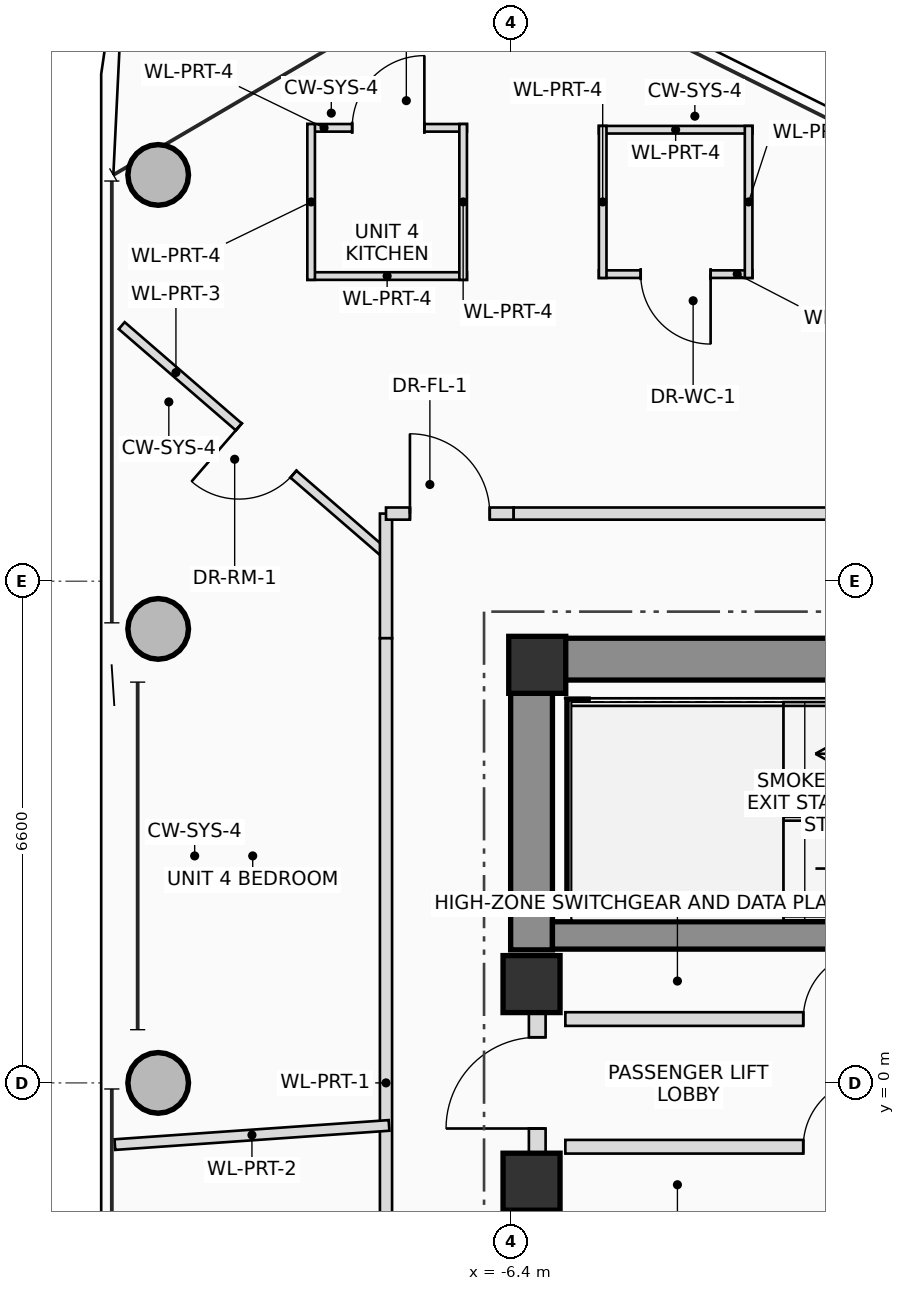
"""IFC4 building model, lengths in metres.
Left out: names, types, materials, properties, quantities, classifications, styles, units other than length and angle.
Written with IfcOpenShell. Run it as: python <this file> out.ifc"""

import sys

from ifc_helpers import new_model, si_unit, direction, frame, frame_2d, origin, origin_2d, place, context, subcontext, project, spatial, rectangle, hollow_circle, extrude, source, transform, mapped, element, fill, save


model = new_model("IFC4")
c1 = context("Model", 3, precision=1e-05, world=origin(), true_north=direction((0.0, 1.0)))
c2 = subcontext(c1, "Body", "Model", "MODEL_VIEW")
j1 = project(units=[si_unit("LENGTHUNIT", "METRE"), si_unit("PLANEANGLEUNIT", "RADIAN")], contexts=[c1])
p1 = place(None, origin())
s1 = spatial("IfcSite", under=j1, at=p1, CompositionType="ELEMENT")
p2 = place(p1, origin())
s2 = spatial("IfcBuilding", under=s1, at=p2, CompositionType="ELEMENT")
p3 = place(p2, frame((0.0, 0.0, 307.1)))
s3 = spatial("IfcBuildingStorey", under=s2, at=p3, CompositionType="ELEMENT", Elevation=307.1)
m1 = source(origin(), c2, "Body", "SweptSolid", [
    extrude(rectangle(XDim=0.75, YDim=0.75, at=origin_2d()), origin(), (0.0, 0.0, 1.0), 3.45),
])
p4 = place(p3, frame((-6.05, 5.5, 0.0), z_axis=(0.0, 0.0, 1.0), x_axis=(1.0, 0.0, 0.0)))
e1 = element("IfcColumn", 1, at=p4, inside=s3, PredefinedType="COLUMN", context=c2, shape_type="MappedRepresentation", body=[
    mapped(m1, transform((0.0, 0.0, 0.0), scale=1.0)),
])
p5 = place(p3, frame((-6.4, 5.575, 0.0), z_axis=(0.0, 0.0, 1.0), x_axis=(1.0, 0.0, 0.0)))
e2 = element("IfcWall", 2, at=p5, inside=s3, PredefinedType="SHEAR", context=c2, shape_type="SweptSolid", body=[
    extrude(rectangle(XDim=12.8, YDim=0.55, at=frame_2d((6.4, 0.0))), origin(), (0.0, 0.0, 1.0), 3.45),
])
p6 = place(p5, frame((8.6, 0.0, 0.0)))
e3 = element("IfcOpeningElement", 3, at=p6, cuts=e2, PredefinedType="OPENING", context=c2, shape_type="SweptSolid", body=[
    extrude(rectangle(XDim=1.2, YDim=2.2, at=frame_2d((0.6, 1.1))), frame((0.0, 0.285, 0.0), z_axis=(0.0, -1.0, 0.0), x_axis=(1.0, 0.0, 0.0)), (0.0, 0.0, 1.0), 0.57),
])
p7 = place(p3, frame((-6.125, 1.75, 0.0), z_axis=(0.0, 0.0, 1.0), x_axis=(0.0, 1.0, 0.0)))
e4 = element("IfcWall", 4, at=p7, inside=s3, PredefinedType="SHEAR", context=c2, shape_type="SweptSolid", body=[
    extrude(rectangle(XDim=3.55, YDim=0.55, at=frame_2d((1.775, 0.0))), origin(), (0.0, 0.0, 1.0), 3.45),
])
p8 = place(p3, frame((-5.85, 1.94, 0.0), z_axis=(0.0, 0.0, 1.0), x_axis=(1.0, 0.0, 0.0)))
e5 = element("IfcWall", 5, at=p8, inside=s3, PredefinedType="SHEAR", context=c2, shape_type="SweptSolid", body=[
    extrude(rectangle(XDim=11.7, YDim=0.36, at=frame_2d((5.85, 0.0))), origin(), (0.0, 0.0, 1.0), 3.45),
])
p9 = place(p3, frame((-5.52, 2.3, 0.0), z_axis=(0.0, 0.0, 1.0), x_axis=(0.0, 1.0, 0.0)))
e6 = element("IfcWall", 6, at=p9, inside=s3, PredefinedType="SHEAR", context=c2, shape_type="SweptSolid", body=[
    extrude(rectangle(XDim=2.75, YDim=0.28, at=frame_2d((1.375, 0.0))), origin(), (0.0, 0.0, 1.0), 3.45),
])
for number, where, z_axis, x_axis in (
    (7, (-6.125, -1.3, 0.0), (0.0, 0.0, 1.0), (1.0, 0.0, 0.0)),
    (8, (-6.125, 1.3, 0.0), (0.0, 0.0, 1.0), (1.0, 0.0, 0.0)),
):
    element("IfcColumn", number, at=place(p3, frame(where, z_axis=z_axis, x_axis=x_axis)), inside=s3, PredefinedType="COLUMN", context=c2, shape_type="MappedRepresentation", body=[
        mapped(m1, transform((0.0, 0.0, 0.0), scale=1.0)),
    ])
m2 = source(origin(), c2, "Body", "SweptSolid", [
    extrude(hollow_circle(Radius=0.4, WallThickness=0.028, at=origin_2d()), origin(), (0.0, 0.0, 1.0), 3.45),
])
for number, where, z_axis, x_axis in (
    (9, (-11.037, 11.945, 0.0), (0.0, 0.0, 1.0), (1.0, 0.0, 0.0)),
    (10, (-11.037, 5.973, 0.0), (0.0, 0.0, 1.0), (1.0, 0.0, 0.0)),
    (11, (-11.037, 0.0, 0.0), (0.0, 0.0, 1.0), (1.0, 0.0, 0.0)),
):
    element("IfcColumn", number, at=place(p3, frame(where, z_axis=z_axis, x_axis=x_axis)), inside=s3, PredefinedType="COLUMN", context=c2, shape_type="MappedRepresentation", body=[
        mapped(m2, transform((0.0, 0.0, 0.0), scale=1.0)),
    ])
p10 = place(p3, frame((-6.05, -0.95, 0.0), z_axis=(0.0, 0.0, 1.0), x_axis=(0.0, 1.0, 0.0)))
e12 = element("IfcWall", 12, at=p10, inside=s3, PredefinedType="PLUMBINGWALL", context=c2, shape_type="SweptSolid", body=[
    extrude(rectangle(XDim=1.9, YDim=0.22, at=frame_2d((0.95, 0.0))), origin(), (0.0, 0.0, 1.0), 2.23),
])
p11 = place(p10, frame((0.35, 0.0, 0.0)))
e13 = element("IfcOpeningElement", 13, at=p11, cuts=e12, PredefinedType="OPENING", context=c2, shape_type="SweptSolid", body=[
    extrude(rectangle(XDim=1.2, YDim=2.2, at=frame_2d((0.6, 1.1))), frame((0.0, 0.12, 0.0), z_axis=(0.0, -1.0, 0.0), x_axis=(1.0, 0.0, 0.0)), (0.0, 0.0, 1.0), 0.24),
])
p12 = place(p3, frame((-5.68, 0.84, 0.0), z_axis=(0.0, 0.0, 1.0), x_axis=(1.0, 0.0, 0.0)))
e14 = element("IfcWall", 14, at=p12, inside=s3, PredefinedType="PLUMBINGWALL", context=c2, shape_type="SweptSolid", body=[
    extrude(rectangle(XDim=11.33, YDim=0.18, at=frame_2d((5.665, 0.0))), origin(), (0.0, 0.0, 1.0), 3.25),
])
p13 = place(p12, frame((3.13, 0.0, 0.0)))
e15 = element("IfcOpeningElement", 15, at=p13, cuts=e14, PredefinedType="OPENING", context=c2, shape_type="SweptSolid", body=[
    extrude(rectangle(XDim=0.9, YDim=2.05, at=frame_2d((0.45, 1.025))), frame((0.0, 0.1, 0.0), z_axis=(0.0, -1.0, 0.0), x_axis=(1.0, 0.0, 0.0)), (0.0, 0.0, 1.0), 0.2),
])
p14 = place(p12, frame((7.33, 0.0, 0.0)))
e16 = element("IfcOpeningElement", 16, at=p14, cuts=e14, PredefinedType="OPENING", context=c2, shape_type="SweptSolid", body=[
    extrude(rectangle(XDim=1.1, YDim=2.2, at=frame_2d((0.55, 1.1))), frame((0.0, 0.1, 0.0), z_axis=(0.0, -1.0, 0.0), x_axis=(1.0, 0.0, 0.0)), (0.0, 0.0, 1.0), 0.2),
])
p15 = place(p12, frame((8.83, 0.0, 0.0)))
e17 = element("IfcOpeningElement", 17, at=p15, cuts=e14, PredefinedType="OPENING", context=c2, shape_type="SweptSolid", body=[
    extrude(rectangle(XDim=1.1, YDim=2.2, at=frame_2d((0.55, 1.1))), frame((0.0, 0.1, 0.0), z_axis=(0.0, -1.0, 0.0), x_axis=(1.0, 0.0, 0.0)), (0.0, 0.0, 1.0), 0.2),
])
p16 = place(p12, frame((10.25, 0.0, 0.0)))
e18 = element("IfcOpeningElement", 18, at=p16, cuts=e14, PredefinedType="OPENING", context=c2, shape_type="SweptSolid", body=[
    extrude(rectangle(XDim=0.9, YDim=2.05, at=frame_2d((0.45, 1.025))), frame((0.0, 0.1, 0.0), z_axis=(0.0, -1.0, 0.0), x_axis=(1.0, 0.0, 0.0)), (0.0, 0.0, 1.0), 0.2),
])
p17 = place(p3, frame((-5.68, -0.84, 0.0), z_axis=(0.0, 0.0, 1.0), x_axis=(1.0, 0.0, 0.0)))
e19 = element("IfcWall", 19, at=p17, inside=s3, PredefinedType="PLUMBINGWALL", context=c2, shape_type="SweptSolid", body=[
    extrude(rectangle(XDim=11.33, YDim=0.18, at=frame_2d((5.665, 0.0))), origin(), (0.0, 0.0, 1.0), 3.25),
])
p18 = place(p17, frame((3.13, 0.0, 0.0)))
e20 = element("IfcOpeningElement", 20, at=p18, cuts=e19, PredefinedType="OPENING", context=c2, shape_type="SweptSolid", body=[
    extrude(rectangle(XDim=0.9, YDim=2.05, at=frame_2d((0.45, 1.025))), frame((0.0, 0.1, 0.0), z_axis=(0.0, -1.0, 0.0), x_axis=(1.0, 0.0, 0.0)), (0.0, 0.0, 1.0), 0.2),
])
p19 = place(p17, frame((7.33, 0.0, 0.0)))
e21 = element("IfcOpeningElement", 21, at=p19, cuts=e19, PredefinedType="OPENING", context=c2, shape_type="SweptSolid", body=[
    extrude(rectangle(XDim=1.1, YDim=2.2, at=frame_2d((0.55, 1.1))), frame((0.0, 0.1, 0.0), z_axis=(0.0, -1.0, 0.0), x_axis=(1.0, 0.0, 0.0)), (0.0, 0.0, 1.0), 0.2),
])
p20 = place(p17, frame((9.58, 0.0, 0.0)))
e22 = element("IfcOpeningElement", 22, at=p20, cuts=e19, PredefinedType="OPENING", context=c2, shape_type="SweptSolid", body=[
    extrude(rectangle(XDim=0.9, YDim=2.05, at=frame_2d((0.45, 1.025))), frame((0.0, 0.1, 0.0), z_axis=(0.0, -1.0, 0.0), x_axis=(1.0, 0.0, 0.0)), (0.0, 0.0, 1.0), 0.2),
])
p21 = place(p3, frame((-8.07, 6.981, 0.0), z_axis=(0.0, 0.0, 1.0), x_axis=(-0.756280799409, 0.654247164644, 0.0)))
e23 = element("IfcWall", 23, at=p21, inside=s3, PredefinedType="PARTITIONING", context=c2, shape_type="SweptSolid", body=[
    extrude(rectangle(XDim=4.558, YDim=0.12, at=frame_2d((2.279, 0.0))), origin(), (0.0, 0.0, 1.0), 2.815),
])
p22 = place(p21, frame((1.571, 0.0, 0.0)))
e24 = element("IfcOpeningElement", 24, at=p22, cuts=e23, PredefinedType="OPENING", context=c2, shape_type="SweptSolid", body=[
    extrude(rectangle(XDim=0.95, YDim=2.1, at=frame_2d((0.475, 1.05))), frame((0.0, 0.07, 0.0), z_axis=(0.0, -1.0, 0.0), x_axis=(1.0, 0.0, 0.0)), (0.0, 0.0, 1.0), 0.14),
])
p23 = place(p3, frame((-5.239, 12.54, 0.0), z_axis=(0.0, 0.0, 1.0), x_axis=(1.0, 0.0, 0.0)))
e25 = element("IfcWall", 25, at=p23, inside=s3, PredefinedType="PARTITIONING", context=c2, shape_type="SweptSolid", body=[
    extrude(rectangle(XDim=2.02, YDim=0.1, at=frame_2d((1.01, 0.0))), origin(), (0.0, 0.0, 1.0), 2.815),
])
p24 = place(p3, frame((-3.219, 10.64, 0.0), z_axis=(0.0, 0.0, 1.0), x_axis=(-1.0, 0.0, 0.0)))
e26 = element("IfcWall", 26, at=p24, inside=s3, PredefinedType="PARTITIONING", context=c2, shape_type="SweptSolid", body=[
    extrude(rectangle(XDim=2.02, YDim=0.1, at=frame_2d((1.01, 0.0))), origin(), (0.0, 0.0, 1.0), 2.905),
])
p25 = place(p24, frame((0.55, 0.0, 0.0)))
e27 = element("IfcOpeningElement", 27, at=p25, cuts=e26, PredefinedType="OPENING", context=c2, shape_type="SweptSolid", body=[
    extrude(rectangle(XDim=0.92, YDim=2.1, at=frame_2d((0.46, 1.05))), frame((0.0, 0.06, 0.0), z_axis=(0.0, -1.0, 0.0), x_axis=(1.0, 0.0, 0.0)), (0.0, 0.0, 1.0), 0.12),
])
p26 = place(p3, frame((-3.269, 12.59, 0.0), z_axis=(0.0, 0.0, 1.0), x_axis=(0.0, -1.0, 0.0)))
e28 = element("IfcWall", 28, at=p26, inside=s3, PredefinedType="PARTITIONING", context=c2, shape_type="SweptSolid", body=[
    extrude(rectangle(XDim=2.0, YDim=0.1, at=frame_2d((1.0, 0.0))), origin(), (0.0, 0.0, 1.0), 2.815),
])
p27 = place(p3, frame((-5.189, 10.59, 0.0), z_axis=(0.0, 0.0, 1.0), x_axis=(0.0, 1.0, 0.0)))
e29 = element("IfcWall", 29, at=p27, inside=s3, PredefinedType="PARTITIONING", context=c2, shape_type="SweptSolid", body=[
    extrude(rectangle(XDim=2.0, YDim=0.1, at=frame_2d((1.0, 0.0))), origin(), (0.0, 0.0, 1.0), 2.905),
])
p28 = place(p3, frame((-9.075, 12.565, 0.0), z_axis=(0.0, 0.0, 1.0), x_axis=(1.0, 0.0, 0.0)))
e30 = element("IfcWall", 30, at=p28, inside=s3, PredefinedType="PARTITIONING", context=c2, shape_type="SweptSolid", body=[
    extrude(rectangle(XDim=2.1, YDim=0.1, at=frame_2d((1.05, 0.0))), origin(), (0.0, 0.0, 1.0), 3.25),
])
p29 = place(p28, frame((0.59, 0.0, 0.0)))
e31 = element("IfcOpeningElement", 31, at=p29, cuts=e30, PredefinedType="OPENING", context=c2, shape_type="SweptSolid", body=[
    extrude(rectangle(XDim=0.95, YDim=2.1, at=frame_2d((0.475, 1.05))), frame((0.0, 0.06, 0.0), z_axis=(0.0, -1.0, 0.0), x_axis=(1.0, 0.0, 0.0)), (0.0, 0.0, 1.0), 0.12),
])
p30 = place(p3, frame((-6.975, 10.615, 0.0), z_axis=(0.0, 0.0, 1.0), x_axis=(-1.0, 0.0, 0.0)))
e32 = element("IfcWall", 32, at=p30, inside=s3, PredefinedType="PARTITIONING", context=c2, shape_type="SweptSolid", body=[
    extrude(rectangle(XDim=2.1, YDim=0.1, at=frame_2d((1.05, 0.0))), origin(), (0.0, 0.0, 1.0), 2.905),
])
p31 = place(p3, frame((-7.025, 12.615, 0.0), z_axis=(0.0, 0.0, 1.0), x_axis=(0.0, -1.0, 0.0)))
e33 = element("IfcWall", 33, at=p31, inside=s3, PredefinedType="PARTITIONING", context=c2, shape_type="SweptSolid", body=[
    extrude(rectangle(XDim=2.05, YDim=0.1, at=frame_2d((1.025, 0.0))), origin(), (0.0, 0.0, 1.0), 2.905),
])
p32 = place(p3, frame((-9.025, 10.565, 0.0), z_axis=(0.0, 0.0, 1.0), x_axis=(0.0, 1.0, 0.0)))
e34 = element("IfcWall", 34, at=p32, inside=s3, PredefinedType="PARTITIONING", context=c2, shape_type="SweptSolid", body=[
    extrude(rectangle(XDim=2.05, YDim=0.1, at=frame_2d((1.025, 0.0))), origin(), (0.0, 0.0, 1.0), 3.25),
])
p33 = place(p3, frame((-8.04, 5.85, 0.0), z_axis=(0.0, 0.0, 1.0), x_axis=(0.0, 1.0, 0.0)))
e35 = element("IfcWall", 35, at=p33, inside=s3, PredefinedType="PARTITIONING", context=c2, shape_type="SweptSolid", body=[
    extrude(rectangle(XDim=1.64, YDim=0.16, at=frame_2d((0.82, 0.0))), origin(), (0.0, 0.0, 1.0), 2.905),
])
p34 = place(p3, frame((-8.04, 7.49, 0.0), z_axis=(0.0, 0.0, 1.0), x_axis=(1.0, 0.0, 0.0)))
e36 = element("IfcWall", 36, at=p34, inside=s3, PredefinedType="PARTITIONING", context=c2, shape_type="SweptSolid", body=[
    extrude(rectangle(XDim=1.68, YDim=0.16, at=frame_2d((0.84, 0.0))), origin(), (0.0, 0.0, 1.0), 2.655),
])
p35 = place(p34, frame((0.315, 0.0, 0.0)))
e37 = element("IfcOpeningElement", 37, at=p35, cuts=e36, PredefinedType="OPENING", context=c2, shape_type="SweptSolid", body=[
    extrude(rectangle(XDim=1.05, YDim=2.2, at=frame_2d((0.525, 1.1))), frame((0.0, 0.09, 0.0), z_axis=(0.0, -1.0, 0.0), x_axis=(1.0, 0.0, 0.0)), (0.0, 0.0, 1.0), 0.18),
])
p36 = place(p3, frame((-6.36, 7.49, 0.0), z_axis=(0.0, 0.0, 1.0), x_axis=(1.0, 0.0, 0.0)))
e38 = element("IfcWall", 38, at=p36, inside=s3, PredefinedType="PARTITIONING", context=c2, shape_type="SweptSolid", body=[
    extrude(rectangle(XDim=9.679, YDim=0.16, at=frame_2d((4.84, 0.0))), origin(), (0.0, 0.0, 1.0), 2.655),
])
p37 = place(p3, frame((-8.04, -5.85, 0.0), z_axis=(0.0, 0.0, 1.0), x_axis=(0.0, 1.0, 0.0)))
e39 = element("IfcWall", 39, at=p37, inside=s3, PredefinedType="PARTITIONING", context=c2, shape_type="SweptSolid", body=[
    extrude(rectangle(XDim=11.7, YDim=0.16, at=frame_2d((5.85, 0.0))), origin(), (0.0, 0.0, 1.0), 2.655),
])
p38 = place(p3, frame((-8.0, -0.559, 0.0), z_axis=(0.0, 0.0, 1.0), x_axis=(-0.99756047181, -0.069807629118, 0.0)))
e40 = element("IfcWall", 40, at=p38, inside=s3, PredefinedType="PARTITIONING", context=c2, shape_type="SweptSolid", body=[
    extrude(rectangle(XDim=3.616, YDim=0.14, at=frame_2d((1.808, 0.0))), origin(), (0.0, 0.0, 1.0), 2.655),
])
p39 = place(p11, origin())
e41 = element("IfcDoor", 41, at=p39, inside=s3, OperationType="SINGLE_SWING_LEFT", PredefinedType="DOOR", context=c2, shape_type="SweptSolid", body=[
    extrude(rectangle(XDim=1.2, YDim=2.2, at=frame_2d((0.6, 1.1))), frame((0.0, 0.025, 0.0), z_axis=(0.0, -1.0, 0.0), x_axis=(1.0, 0.0, 0.0)), (0.0, 0.0, 1.0), 0.05),
])
fill(e13, e41)
p40 = place(p13, origin())
e42 = element("IfcDoor", 42, at=p40, inside=s3, OperationType="SINGLE_SWING_RIGHT", PredefinedType="DOOR", context=c2, shape_type="SweptSolid", body=[
    extrude(rectangle(XDim=0.9, YDim=2.05, at=frame_2d((0.45, 1.025))), frame((0.0, 0.025, 0.0), z_axis=(0.0, -1.0, 0.0), x_axis=(1.0, 0.0, 0.0)), (0.0, 0.0, 1.0), 0.05),
])
fill(e15, e42)
p41 = place(p18, origin())
e43 = element("IfcDoor", 43, at=p41, inside=s3, OperationType="SINGLE_SWING_RIGHT", PredefinedType="DOOR", context=c2, shape_type="SweptSolid", body=[
    extrude(rectangle(XDim=0.9, YDim=2.05, at=frame_2d((0.45, 1.025))), frame((0.0, 0.025, 0.0), z_axis=(0.0, -1.0, 0.0), x_axis=(1.0, 0.0, 0.0)), (0.0, 0.0, 1.0), 0.05),
])
fill(e20, e43)
p42 = place(p22, origin())
e44 = element("IfcDoor", 44, at=p42, inside=s3, OperationType="SINGLE_SWING_RIGHT", PredefinedType="DOOR", context=c2, shape_type="SweptSolid", body=[
    extrude(rectangle(XDim=0.95, YDim=2.1, at=frame_2d((0.475, 1.05))), frame((0.0, 0.025, 0.0), z_axis=(0.0, -1.0, 0.0), x_axis=(1.0, 0.0, 0.0)), (0.0, 0.0, 1.0), 0.05),
])
fill(e24, e44)
p43 = place(p25, origin())
e45 = element("IfcDoor", 45, at=p43, inside=s3, OperationType="SINGLE_SWING_LEFT", PredefinedType="DOOR", context=c2, shape_type="SweptSolid", body=[
    extrude(rectangle(XDim=0.92, YDim=2.1, at=frame_2d((0.46, 1.05))), frame((0.0, 0.025, 0.0), z_axis=(0.0, -1.0, 0.0), x_axis=(1.0, 0.0, 0.0)), (0.0, 0.0, 1.0), 0.05),
])
fill(e27, e45)
p44 = place(p29, origin())
e46 = element("IfcDoor", 46, at=p44, inside=s3, OperationType="SINGLE_SWING_RIGHT", PredefinedType="DOOR", context=c2, shape_type="SweptSolid", body=[
    extrude(rectangle(XDim=0.95, YDim=2.1, at=frame_2d((0.475, 1.05))), frame((0.0, 0.025, 0.0), z_axis=(0.0, -1.0, 0.0), x_axis=(1.0, 0.0, 0.0)), (0.0, 0.0, 1.0), 0.05),
])
fill(e31, e46)
p45 = place(p35, origin())
e47 = element("IfcDoor", 47, at=p45, inside=s3, OperationType="SINGLE_SWING_LEFT", PredefinedType="DOOR", context=c2, shape_type="SweptSolid", body=[
    extrude(rectangle(XDim=1.05, YDim=2.2, at=frame_2d((0.525, 1.1))), frame((0.0, 0.025, 0.0), z_axis=(0.0, -1.0, 0.0), x_axis=(1.0, 0.0, 0.0)), (0.0, 0.0, 1.0), 0.05),
])
fill(e37, e47)
save(model, sys.argv[1])
